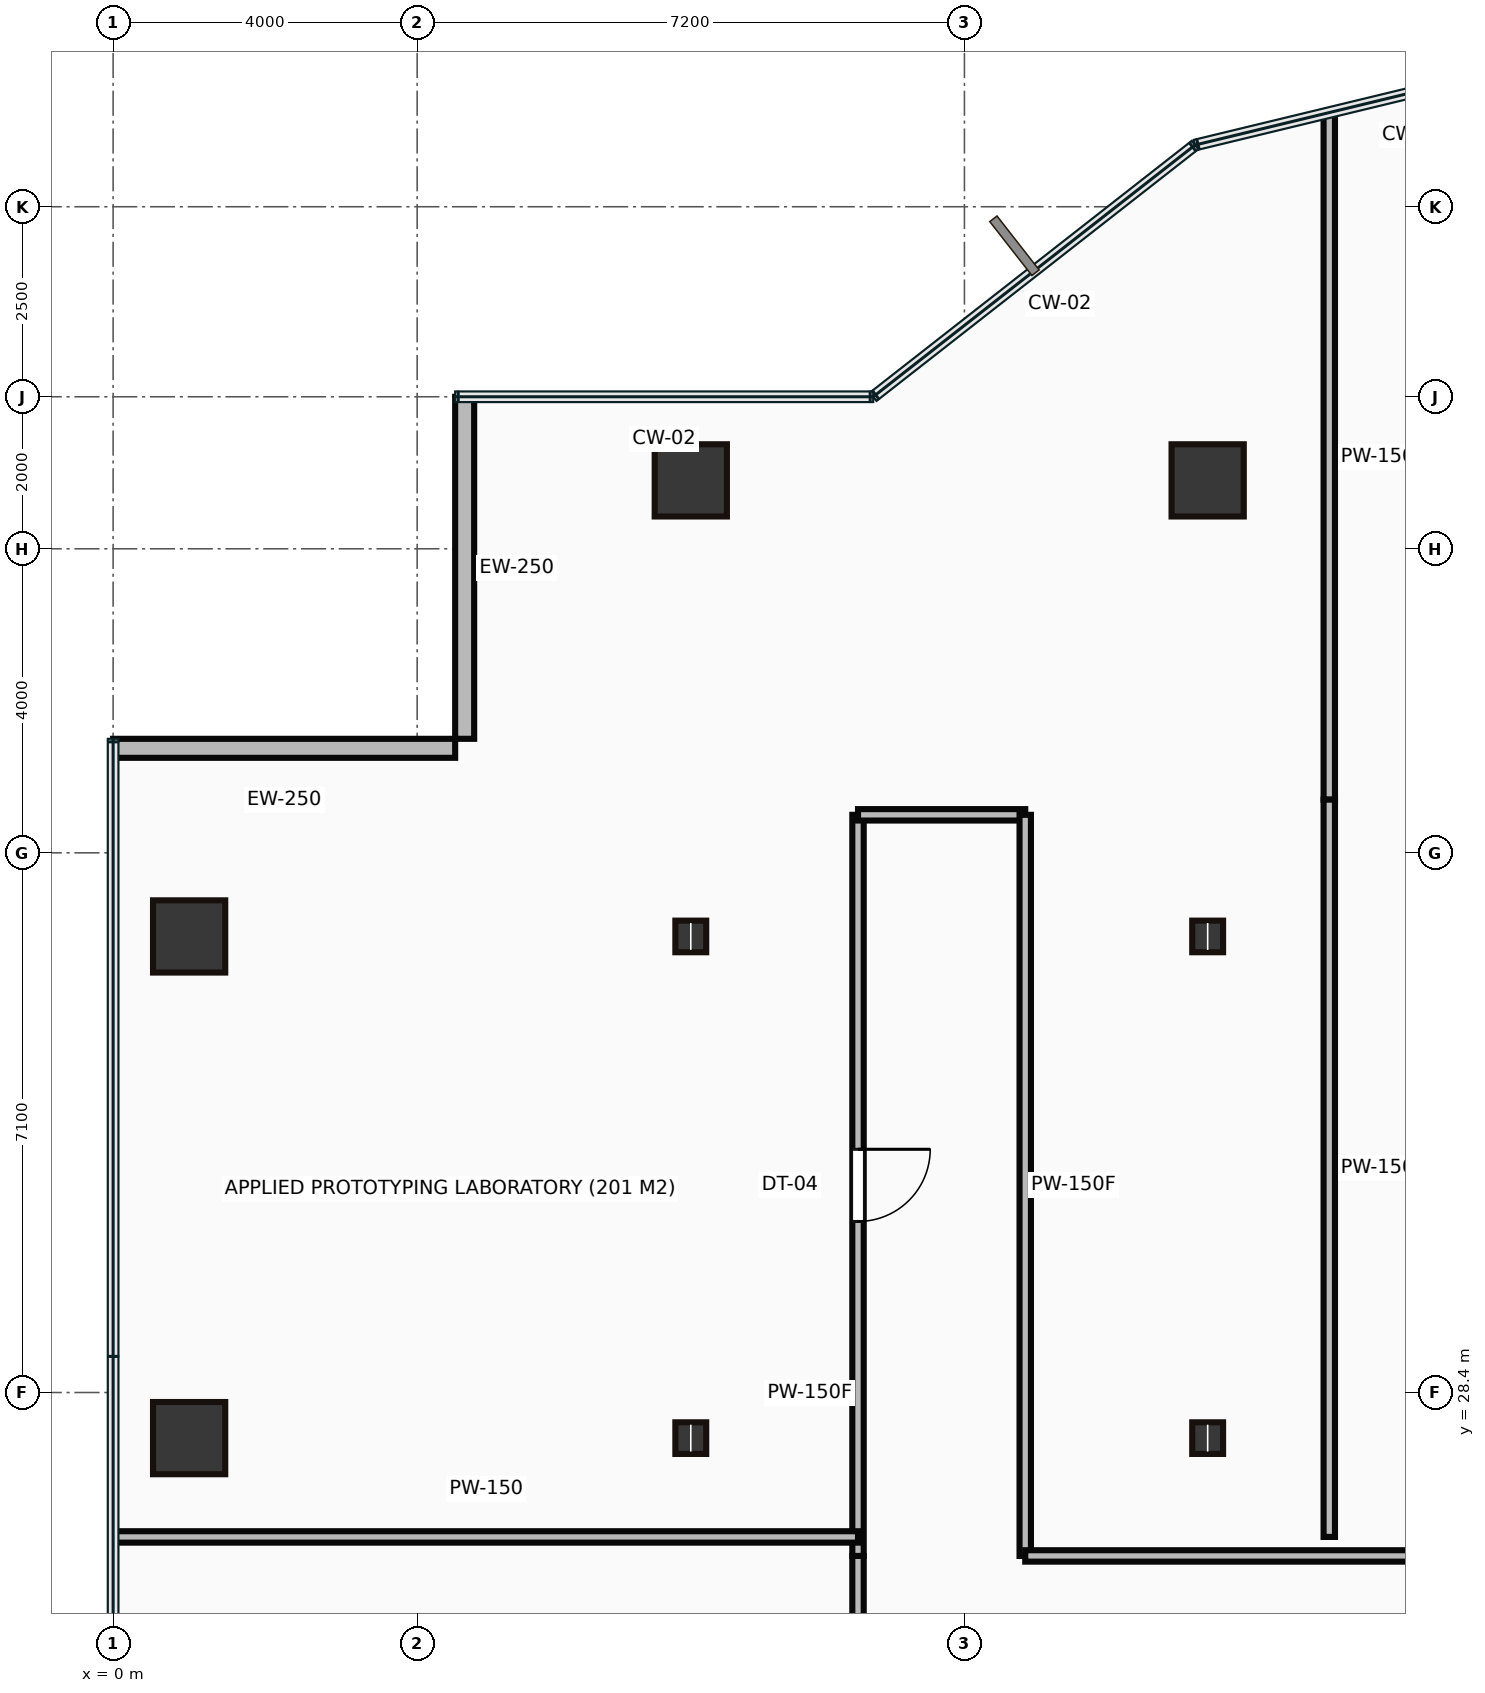
"""IFC4 building model, lengths in metres.
Left out: names, types, materials, properties, quantities, classifications, styles, units other than length and angle.
Written with IfcOpenShell. Run it as: python <this file> out.ifc"""

import sys

from ifc_helpers import new_model, si_unit, direction, frame, frame_2d, origin, origin_2d, place, context, subcontext, project, spatial, rectangle, hollow_rectangle, i_section, extrude, source, transform, mapped, element, fill, save


model = new_model("IFC4")
c1 = context("Model", 3, precision=1e-05, world=origin(), true_north=direction((0.0, 1.0)))
c2 = subcontext(c1, "Body", "Model", "MODEL_VIEW")
j1 = project(units=[si_unit("LENGTHUNIT", "METRE"), si_unit("PLANEANGLEUNIT", "RADIAN")], contexts=[c1])
p1 = place(None, origin())
s1 = spatial("IfcSite", under=j1, at=p1, CompositionType="ELEMENT")
p2 = place(p1, origin())
s2 = spatial("IfcBuilding", under=s1, at=p2, CompositionType="ELEMENT")
p3 = place(p2, frame((0.0, 0.0, 43.45)))
s3 = spatial("IfcBuildingStorey", under=s2, at=p3, CompositionType="ELEMENT", Elevation=43.45)
m1 = source(origin(), c2, "Body", "SweptSolid", [
    extrude(hollow_rectangle(XDim=0.95, YDim=0.95, WallThickness=0.045, at=origin_2d()), origin(), (0.0, 0.0, 1.0), 3.65),
])
for number, where, z_axis, x_axis in (
    (1, (1.0, 27.8, 0.0), (0.0, 0.0, 1.0), (1.0, 0.0, 0.0)),
    (2, (1.0, 34.4, 0.0), (0.0, 0.0, 1.0), (1.0, 0.0, 0.0)),
):
    element("IfcColumn", number, at=place(p3, frame(where, z_axis=z_axis, x_axis=x_axis)), inside=s3, PredefinedType="COLUMN", context=c2, shape_type="MappedRepresentation", body=[
        mapped(m1, transform((0.0, 0.0, 0.0))),
    ])
m2 = source(origin(), c2, "Body", "SweptSolid", [
    extrude(i_section(OverallWidth=0.406, OverallDepth=0.416, WebThickness=0.03, FlangeThickness=0.048, at=origin_2d()), origin(), (0.0, 0.0, 1.0), 3.65),
])
for number, where, z_axis, x_axis in (
    (3, (7.6, 27.8, 0.0), (0.0, 0.0, 1.0), (1.0, 0.0, 0.0)),
    (4, (7.6, 34.4, 0.0), (0.0, 0.0, 1.0), (1.0, 0.0, 0.0)),
):
    element("IfcColumn", number, at=place(p3, frame(where, z_axis=z_axis, x_axis=x_axis)), inside=s3, PredefinedType="COLUMN", context=c2, shape_type="MappedRepresentation", body=[
        mapped(m2, transform((0.0, 0.0, 0.0))),
    ])
p4 = place(p3, frame((7.6, 40.4, 0.0), z_axis=(0.0, 0.0, 1.0), x_axis=(1.0, 0.0, 0.0)))
e5 = element("IfcColumn", 5, at=p4, inside=s3, PredefinedType="COLUMN", context=c2, shape_type="MappedRepresentation", body=[
    mapped(m1, transform((0.0, 0.0, 0.0))),
])
for number, where, z_axis, x_axis in (
    (6, (14.4, 27.8, 0.0), (0.0, 0.0, 1.0), (1.0, 0.0, 0.0)),
    (7, (14.4, 34.4, 0.0), (0.0, 0.0, 1.0), (1.0, 0.0, 0.0)),
):
    element("IfcColumn", number, at=place(p3, frame(where, z_axis=z_axis, x_axis=x_axis)), inside=s3, PredefinedType="COLUMN", context=c2, shape_type="MappedRepresentation", body=[
        mapped(m2, transform((0.0, 0.0, 0.0))),
    ])
p5 = place(p3, frame((14.4, 40.4, 0.0), z_axis=(0.0, 0.0, 1.0), x_axis=(1.0, 0.0, 0.0)))
e8 = element("IfcColumn", 8, at=p5, inside=s3, PredefinedType="COLUMN", context=c2, shape_type="MappedRepresentation", body=[
    mapped(m1, transform((0.0, 0.0, 0.0))),
])
m3 = source(origin(), c2, "Body", "SweptSolid", [
    extrude(rectangle(XDim=4.5, YDim=0.25, at=frame_2d((2.25, 0.0))), origin(), (0.0, 0.0, 1.0), 3.4),
])
for number, where, z_axis, x_axis in (
    (9, (4.625, 41.5, 0.0), (0.0, 0.0, 1.0), (0.0, -1.0, 0.0)),
    (10, (4.5, 36.875, 0.0), (0.0, 0.0, 1.0), (-1.0, 0.0, 0.0)),
):
    element("IfcWall", number, at=place(p3, frame(where, z_axis=z_axis, x_axis=x_axis)), inside=s3, PredefinedType="STANDARD", context=c2, shape_type="MappedRepresentation", body=[
        mapped(m3, transform((0.0, 0.0, 0.0))),
    ])
m4 = source(origin(), c2, "Body", "SweptSolid", [
    extrude(rectangle(XDim=2.05, YDim=0.15, at=frame_2d((1.025, 0.0))), origin(), (0.0, 0.0, 1.0), 3.4),
])
p6 = place(p3, frame((9.8, 24.2, 0.0), z_axis=(0.0, 0.0, 1.0), x_axis=(0.0, 1.0, 0.0)))
e11 = element("IfcWall", 11, at=p6, inside=s3, PredefinedType="PARTITIONING", context=c2, shape_type="MappedRepresentation", body=[
    mapped(m4, transform((0.0, 0.0, 0.0))),
])
m5 = source(origin(), c2, "Body", "SweptSolid", [
    extrude(rectangle(XDim=9.75, YDim=0.15, at=frame_2d((4.875, 0.0))), origin(), (0.0, 0.0, 1.0), 3.4),
])
p7 = place(p3, frame((9.8, 26.25, 0.0), z_axis=(0.0, 0.0, 1.0), x_axis=(0.0, 1.0, 0.0)))
e12 = element("IfcWall", 12, at=p7, inside=s3, PredefinedType="PARTITIONING", context=c2, shape_type="MappedRepresentation", body=[
    mapped(m5, transform((0.0, 0.0, 0.0))),
])
p8 = place(p7, frame((4.4, 0.0, 0.0)))
e13 = element("IfcOpeningElement", 13, at=p8, cuts=e12, PredefinedType="OPENING", context=c2, shape_type="SweptSolid", body=[
    extrude(rectangle(XDim=0.95, YDim=2.15, at=frame_2d((0.475, 1.075))), frame((0.0, 0.085, 0.0), z_axis=(0.0, -1.0, 0.0), x_axis=(1.0, 0.0, 0.0)), (0.0, 0.0, 1.0), 0.17),
])
m6 = source(origin(), c2, "Body", "SweptSolid", [
    extrude(rectangle(XDim=2.2, YDim=0.15, at=frame_2d((1.1, 0.0))), origin(), (0.0, 0.0, 1.0), 3.4),
])
p9 = place(p3, frame((9.8, 36.0, 0.0), z_axis=(0.0, 0.0, 1.0), x_axis=(1.0, 0.0, 0.0)))
e14 = element("IfcWall", 14, at=p9, inside=s3, PredefinedType="PARTITIONING", context=c2, shape_type="MappedRepresentation", body=[
    mapped(m6, transform((0.0, 0.0, 0.0))),
])
p10 = place(p3, frame((12.0, 36.0, 0.0), z_axis=(0.0, 0.0, 1.0), x_axis=(0.0, -1.0, 0.0)))
e15 = element("IfcWall", 15, at=p10, inside=s3, PredefinedType="PARTITIONING", context=c2, shape_type="MappedRepresentation", body=[
    mapped(m5, transform((0.0, 0.0, 0.0))),
])
m7 = source(origin(), c2, "Body", "SweptSolid", [
    extrude(rectangle(XDim=18.4, YDim=0.15, at=frame_2d((9.2, 0.0))), origin(), (0.0, 0.0, 1.0), 3.4),
])
p11 = place(p3, frame((12.0, 26.25, 0.0), z_axis=(0.0, 0.0, 1.0), x_axis=(1.0, 0.0, 0.0)))
e16 = element("IfcWall", 16, at=p11, inside=s3, PredefinedType="PARTITIONING", context=c2, shape_type="MappedRepresentation", body=[
    mapped(m7, transform((0.0, 0.0, 0.0))),
])
p12 = place(p11, frame((10.595, 0.0, 0.0)))
e17 = element("IfcOpeningElement", 17, at=p12, cuts=e16, PredefinedType="OPENING", context=c2, shape_type="SweptSolid", body=[
    extrude(rectangle(XDim=0.95, YDim=2.15, at=frame_2d((0.475, 1.075))), frame((0.0, 0.085, 0.0), z_axis=(0.0, -1.0, 0.0), x_axis=(1.0, 0.0, 0.0)), (0.0, 0.0, 1.0), 0.17),
])
m8 = source(origin(), c2, "Body", "SweptSolid", [
    extrude(rectangle(XDim=9.78, YDim=0.15, at=frame_2d((4.89, 0.0))), origin(), (0.0, 0.0, 1.0), 3.4),
])
p13 = place(p3, frame((0.02, 26.5, 0.0), z_axis=(0.0, 0.0, 1.0), x_axis=(1.0, 0.0, 0.0)))
e18 = element("IfcWall", 18, at=p13, inside=s3, PredefinedType="PARTITIONING", context=c2, shape_type="MappedRepresentation", body=[
    mapped(m8, transform((0.0, 0.0, 0.0))),
])
m9 = source(origin(), c2, "Body", "SweptSolid", [
    extrude(rectangle(XDim=9.018, YDim=0.15, at=frame_2d((4.509, 0.0))), origin(), (0.0, 0.0, 1.0), 3.4),
])
p14 = place(p3, frame((16.0, 45.218, 0.0), z_axis=(0.0, 0.0, 1.0), x_axis=(0.0, -1.0, 0.0)))
e19 = element("IfcWall", 19, at=p14, inside=s3, PredefinedType="PARTITIONING", context=c2, shape_type="MappedRepresentation", body=[
    mapped(m9, transform((0.0, 0.0, 0.0))),
])
m10 = source(origin(), c2, "Body", "SweptSolid", [
    extrude(rectangle(XDim=9.7, YDim=0.15, at=frame_2d((4.85, 0.0))), origin(), (0.0, 0.0, 1.0), 3.4),
])
p15 = place(p3, frame((16.0, 36.2, 0.0), z_axis=(0.0, 0.0, 1.0), x_axis=(0.0, -1.0, 0.0)))
e20 = element("IfcWall", 20, at=p15, inside=s3, PredefinedType="PARTITIONING", context=c2, shape_type="MappedRepresentation", body=[
    mapped(m10, transform((0.0, 0.0, 0.0))),
])
m11 = source(origin(), c2, "Body", "SweptSolid", [
    extrude(rectangle(XDim=0.95, YDim=2.15, at=frame_2d((0.475, 1.075))), frame((0.0, 0.025, 0.0), z_axis=(0.0, -1.0, 0.0), x_axis=(1.0, 0.0, 0.0)), (0.0, 0.0, 1.0), 0.05),
])
p16 = place(p8, origin())
e21 = element("IfcDoor", 21, at=p16, inside=s3, OperationType="SINGLE_SWING_RIGHT", PredefinedType="DOOR", context=c2, shape_type="MappedRepresentation", body=[
    mapped(m11, transform((0.0, 0.0, 0.0))),
])
fill(e13, e21)
save(model, sys.argv[1])
